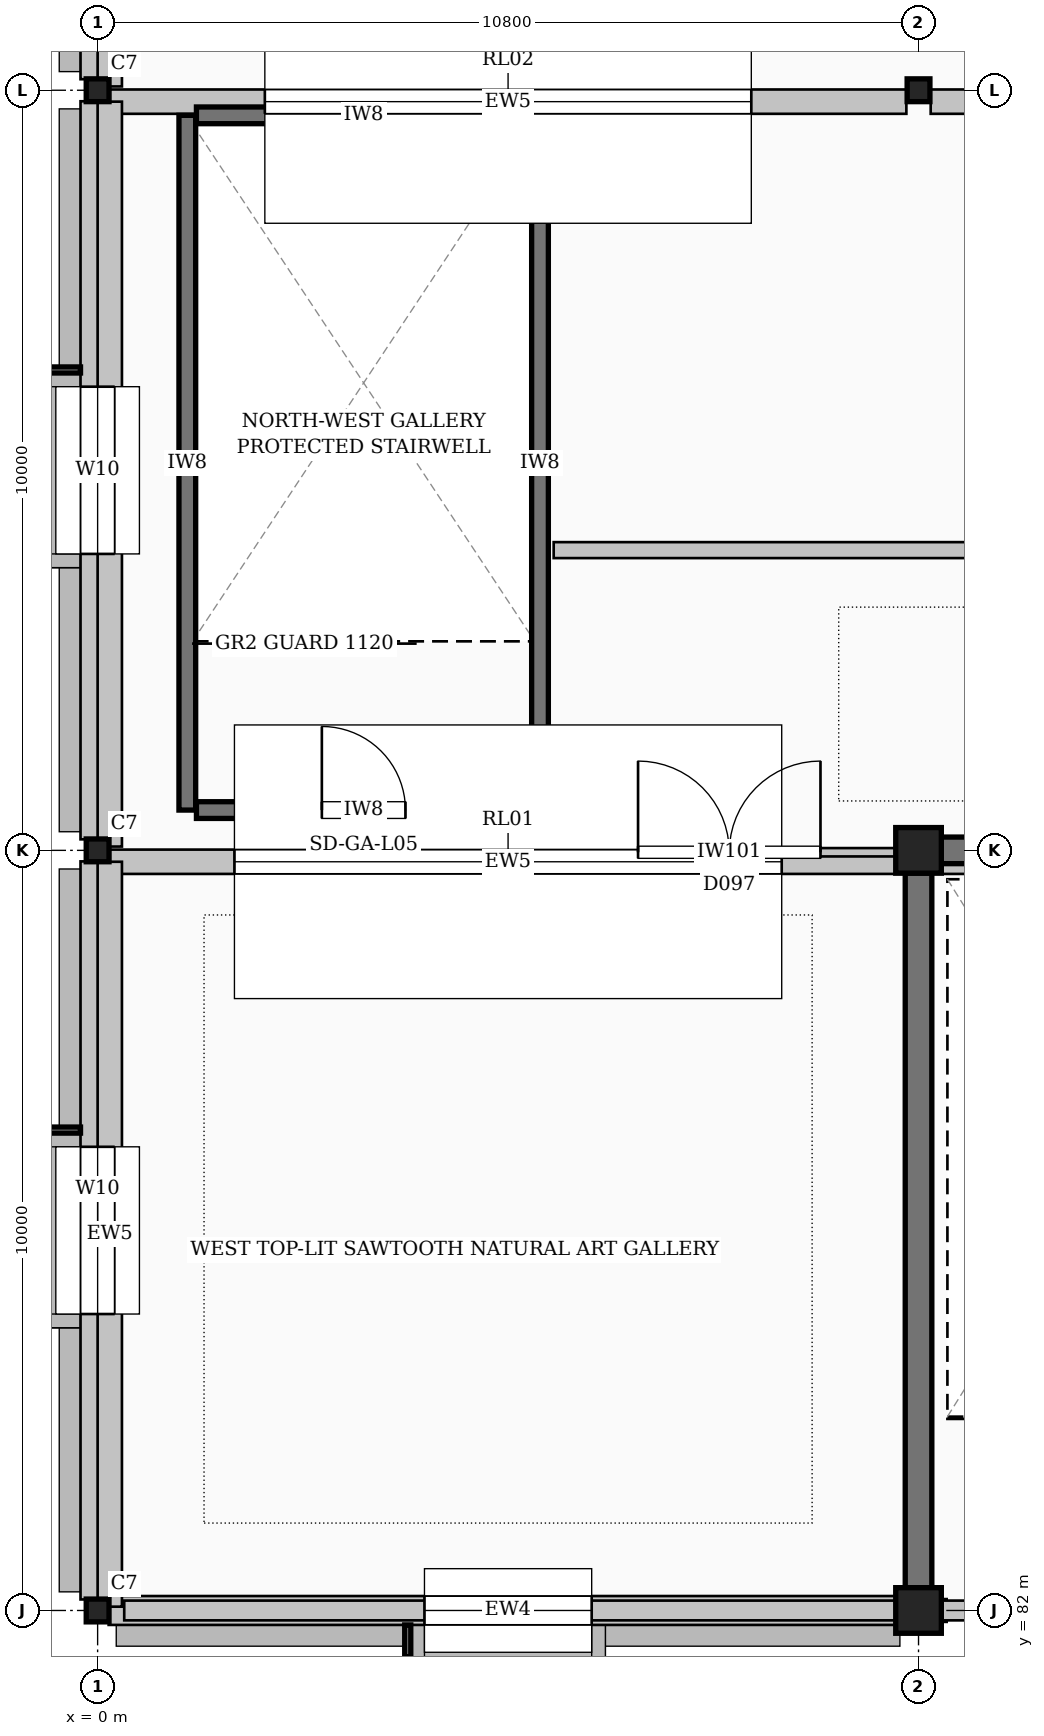
"""IFC4 building model, lengths in metres.
Left out: names, types, materials, properties, quantities, classifications, styles, units other than length and angle.
Written with IfcOpenShell. Run it as: python <this file> out.ifc"""

import sys

from ifc_helpers import new_model, si_unit, direction, frame, frame_2d, origin, origin_2d, place, context, subcontext, project, spatial, polyline, rectangle, i_section, outline, extrude, element, fill, save


model = new_model("IFC4")
c1 = context("Model", 3, precision=1e-05, world=origin(), true_north=direction((0.0, 1.0)))
c2 = subcontext(c1, "Body", "Model", "MODEL_VIEW")
j1 = project(units=[si_unit("LENGTHUNIT", "METRE"), si_unit("PLANEANGLEUNIT", "RADIAN")], contexts=[c1])
p1 = place(None, origin())
s1 = spatial("IfcSite", under=j1, at=p1, CompositionType="ELEMENT")
p2 = place(p1, origin())
s2 = spatial("IfcBuilding", under=s1, at=p2, CompositionType="ELEMENT")
p3 = place(p2, frame((0.0, 0.0, 28.8)))
s3 = spatial("IfcBuildingStorey", under=s2, at=p3, CompositionType="ELEMENT", Elevation=28.8)
for number, where, z_axis, x_axis in (
    (1, (0.0, 82.0, 0.0), (0.0, 0.0, 1.0), (1.0, 0.0, 0.0)),
    (2, (0.0, 92.0, 0.0), (0.0, 0.0, 1.0), (1.0, 0.0, 0.0)),
    (3, (0.0, 102.0, 0.0), (0.0, 0.0, 1.0), (1.0, 0.0, 0.0)),
):
    element("IfcColumn", number, at=place(p3, frame(where, z_axis=z_axis, x_axis=x_axis)), inside=s3, PredefinedType="COLUMN", context=c2, shape_type="SweptSolid", body=[
        extrude(i_section(OverallWidth=0.3, OverallDepth=0.3, WebThickness=0.011, FlangeThickness=0.019, FilletRadius=0.027, at=origin_2d()), origin(), (0.0, 0.0, 1.0), 5.4),
    ])
for number, where, z_axis, x_axis in (
    (4, (10.8, 82.0, 0.0), (0.0, 0.0, 1.0), (1.0, 0.0, 0.0)),
    (5, (10.8, 92.0, 0.0), (0.0, 0.0, 1.0), (1.0, 0.0, 0.0)),
):
    element("IfcColumn", number, at=place(p3, frame(where, z_axis=z_axis, x_axis=x_axis)), inside=s3, PredefinedType="COLUMN", context=c2, shape_type="SweptSolid", body=[
        extrude(rectangle(XDim=0.6, YDim=0.6, at=origin_2d()), origin(), (0.0, 0.0, 1.0), 5.4),
    ])
p4 = place(p3, frame((10.8, 102.0, 0.0), z_axis=(0.0, 0.0, 1.0), x_axis=(1.0, 0.0, 0.0)))
e6 = element("IfcColumn", 6, at=p4, inside=s3, PredefinedType="COLUMN", context=c2, shape_type="SweptSolid", body=[
    extrude(i_section(OverallWidth=0.3, OverallDepth=0.3, WebThickness=0.011, FlangeThickness=0.019, FilletRadius=0.027, at=origin_2d()), origin(), (0.0, 0.0, 1.0), 5.4),
])
p5 = place(p3, frame((0.0, 111.855, 0.0), z_axis=(0.0, 0.0, 1.0), x_axis=(0.0, -1.0, 0.0)))
e7 = element("IfcWall", 7, at=p5, inside=s3, PredefinedType="STANDARD", context=c2, shape_type="SweptSolid", body=[
    extrude(rectangle(XDim=9.71, YDim=0.45, at=frame_2d((4.855, 0.0))), origin(), (0.0, 0.0, 1.0), 5.16),
])
p6 = place(p5, frame((3.755, 0.0, 1.0)))
e8 = element("IfcOpeningElement", 8, at=p6, cuts=e7, PredefinedType="OPENING", context=c2, shape_type="SweptSolid", body=[
    extrude(rectangle(XDim=2.2, YDim=3.0, at=frame_2d((1.1, 1.5))), frame((0.0, 0.235, 0.0), z_axis=(0.0, -1.0, 0.0), x_axis=(1.0, 0.0, 0.0)), (0.0, 0.0, 1.0), 0.47),
])
p7 = place(p3, frame((0.0, 101.855, 0.0), z_axis=(0.0, 0.0, 1.0), x_axis=(0.0, -1.0, 0.0)))
e9 = element("IfcWall", 9, at=p7, inside=s3, PredefinedType="STANDARD", context=c2, shape_type="SweptSolid", body=[
    extrude(rectangle(XDim=9.71, YDim=0.45, at=frame_2d((4.855, 0.0))), origin(), (0.0, 0.0, 1.0), 5.16),
])
p8 = place(p7, frame((3.755, 0.0, 1.0)))
e10 = element("IfcOpeningElement", 10, at=p8, cuts=e9, PredefinedType="OPENING", context=c2, shape_type="SweptSolid", body=[
    extrude(rectangle(XDim=2.2, YDim=3.0, at=frame_2d((1.1, 1.5))), frame((0.0, 0.235, 0.0), z_axis=(0.0, -1.0, 0.0), x_axis=(1.0, 0.0, 0.0)), (0.0, 0.0, 1.0), 0.47),
])
p9 = place(p3, frame((0.0, 91.855, 0.0), z_axis=(0.0, 0.0, 1.0), x_axis=(0.0, -1.0, 0.0)))
e11 = element("IfcWall", 11, at=p9, inside=s3, PredefinedType="STANDARD", context=c2, shape_type="SweptSolid", body=[
    extrude(rectangle(XDim=9.71, YDim=0.45, at=frame_2d((4.855, 0.0))), origin(), (0.0, 0.0, 1.0), 5.16),
])
p10 = place(p9, frame((3.755, 0.0, 1.0)))
e12 = element("IfcOpeningElement", 12, at=p10, cuts=e11, PredefinedType="OPENING", context=c2, shape_type="SweptSolid", body=[
    extrude(rectangle(XDim=2.2, YDim=3.0, at=frame_2d((1.1, 1.5))), frame((0.0, 0.235, 0.0), z_axis=(0.0, -1.0, 0.0), x_axis=(1.0, 0.0, 0.0)), (0.0, 0.0, 1.0), 0.47),
])
p11 = place(p3, frame((0.145, 82.0, 0.0), z_axis=(0.0, 0.0, 1.0), x_axis=(1.0, 0.0, 0.0)))
e13 = element("IfcWall", 13, at=p11, inside=s3, PredefinedType="STANDARD", context=c2, shape_type="SweptSolid", body=[
    extrude(rectangle(XDim=10.51, YDim=0.38, at=frame_2d((5.255, 0.0))), origin(), (0.0, 0.0, 1.0), 5.044),
])
p12 = place(p11, frame((4.155, 0.0, 1.0)))
e14 = element("IfcOpeningElement", 14, at=p12, cuts=e13, PredefinedType="OPENING", context=c2, shape_type="SweptSolid", body=[
    extrude(rectangle(XDim=2.2, YDim=3.0, at=frame_2d((1.1, 1.5))), frame((0.0, 0.2, 0.0), z_axis=(0.0, -1.0, 0.0), x_axis=(1.0, 0.0, 0.0)), (0.0, 0.0, 1.0), 0.4),
])
p13 = place(p3, frame((10.945, 82.0, 0.0), z_axis=(0.0, 0.0, 1.0), x_axis=(1.0, 0.0, 0.0)))
e15 = element("IfcWall", 15, at=p13, inside=s3, PredefinedType="STANDARD", context=c2, shape_type="SweptSolid", body=[
    extrude(rectangle(XDim=0.225, YDim=0.3, at=frame_2d((0.112, 0.0))), origin(), (0.0, 0.0, 1.0), 5.16),
])
p14 = place(p3, frame((0.16, 91.85, 5.4), z_axis=(0.0, 0.0, 1.0), x_axis=(1.0, 0.0, 0.0)))
e16 = element("IfcWall", 16, at=p14, inside=s3, PredefinedType="STANDARD", context=c2, shape_type="SweptSolid", body=[
    extrude(rectangle(XDim=10.48, YDim=0.32, at=frame_2d((5.24, 0.0))), origin(), (0.0, 0.0, 1.0), 2.45),
])
p15 = place(p14, frame((1.64, 0.0, 0.45)))
e17 = element("IfcOpeningElement", 17, at=p15, cuts=e16, PredefinedType="OPENING", context=c2, shape_type="SweptSolid", body=[
    extrude(rectangle(XDim=7.2, YDim=1.5, at=frame_2d((3.6, 0.75))), frame((0.0, 0.17, 0.0), z_axis=(0.0, -1.0, 0.0), x_axis=(1.0, 0.0, 0.0)), (0.0, 0.0, 1.0), 0.34),
])
p16 = place(p3, frame((10.96, 91.85, 5.4), z_axis=(0.0, 0.0, 1.0), x_axis=(1.0, 0.0, 0.0)))
e18 = element("IfcWall", 18, at=p16, inside=s3, PredefinedType="STANDARD", context=c2, shape_type="SweptSolid", body=[
    extrude(rectangle(XDim=10.48, YDim=0.32, at=frame_2d((5.24, 0.0))), origin(), (0.0, 0.0, 1.0), 2.45),
])
p17 = place(p16, frame((1.64, 0.0, 0.45)))
e19 = element("IfcOpeningElement", 19, at=p17, cuts=e18, PredefinedType="OPENING", context=c2, shape_type="SweptSolid", body=[
    extrude(rectangle(XDim=7.2, YDim=1.5, at=frame_2d((3.6, 0.75))), frame((0.0, 0.17, 0.0), z_axis=(0.0, -1.0, 0.0), x_axis=(1.0, 0.0, 0.0)), (0.0, 0.0, 1.0), 0.34),
])
p18 = place(p3, frame((0.16, 82.05, 5.4), z_axis=(0.0, 0.0, 1.0), x_axis=(0.0, 1.0, 0.0)))
e20 = element("IfcWall", 20, at=p18, inside=s3, PredefinedType="STANDARD", context=c2, shape_type="SweptSolid", body=[
    extrude(outline(polyline([(0.0, 0.0), (9.8, 0.0), (9.8, 2.55), (0.0, 0.15), (0.0, 0.0)])), frame((0.0, 0.16, 0.0), z_axis=(0.0, -1.0, 0.0), x_axis=(1.0, 0.0, 0.0)), (0.0, 0.0, 1.0), 0.32),
])
p19 = place(p3, frame((0.16, 101.85, 5.4), z_axis=(0.0, 0.0, 1.0), x_axis=(1.0, 0.0, 0.0)))
e21 = element("IfcWall", 21, at=p19, inside=s3, PredefinedType="STANDARD", context=c2, shape_type="SweptSolid", body=[
    extrude(rectangle(XDim=10.48, YDim=0.32, at=frame_2d((5.24, 0.0))), origin(), (0.0, 0.0, 1.0), 2.45),
])
p20 = place(p19, frame((2.04, 0.0, 0.45)))
e22 = element("IfcOpeningElement", 22, at=p20, cuts=e21, PredefinedType="OPENING", context=c2, shape_type="SweptSolid", body=[
    extrude(rectangle(XDim=6.4, YDim=1.5, at=frame_2d((3.2, 0.75))), frame((0.0, 0.17, 0.0), z_axis=(0.0, -1.0, 0.0), x_axis=(1.0, 0.0, 0.0)), (0.0, 0.0, 1.0), 0.34),
])
p21 = place(p3, frame((10.96, 101.85, 5.4), z_axis=(0.0, 0.0, 1.0), x_axis=(1.0, 0.0, 0.0)))
e23 = element("IfcWall", 23, at=p21, inside=s3, PredefinedType="STANDARD", context=c2, shape_type="SweptSolid", body=[
    extrude(rectangle(XDim=10.48, YDim=0.32, at=frame_2d((5.24, 0.0))), origin(), (0.0, 0.0, 1.0), 2.45),
])
p22 = place(p21, frame((2.04, 0.0, 0.45)))
e24 = element("IfcOpeningElement", 24, at=p22, cuts=e23, PredefinedType="OPENING", context=c2, shape_type="SweptSolid", body=[
    extrude(rectangle(XDim=6.4, YDim=1.5, at=frame_2d((3.2, 0.75))), frame((0.0, 0.17, 0.0), z_axis=(0.0, -1.0, 0.0), x_axis=(1.0, 0.0, 0.0)), (0.0, 0.0, 1.0), 0.34),
])
for number, where, z_axis, x_axis in (
    (25, (0.16, 92.05, 5.4), (0.0, 0.0, 1.0), (0.0, 1.0, 0.0)),
    (26, (0.16, 102.05, 5.4), (0.0, 0.0, 1.0), (0.0, 1.0, 0.0)),
):
    element("IfcWall", number, at=place(p3, frame(where, z_axis=z_axis, x_axis=x_axis)), inside=s3, PredefinedType="STANDARD", context=c2, shape_type="SweptSolid", body=[
        extrude(outline(polyline([(0.0, 0.0), (9.8, 0.0), (9.8, 2.55), (0.0, 0.15), (0.0, 0.0)])), frame((0.0, 0.16, 0.0), z_axis=(0.0, -1.0, 0.0), x_axis=(1.0, 0.0, 0.0)), (0.0, 0.0, 1.0), 0.32),
    ])
p23 = place(p3, frame((0.35, 82.0, 5.22), z_axis=(0.0, 0.0, 1.0), x_axis=(1.0, 0.0, 0.0)))
e27 = element("IfcWall", 27, at=p23, inside=s3, PredefinedType="PARAPET", context=c2, shape_type="SweptSolid", body=[
    extrude(rectangle(XDim=74.9, YDim=0.26, at=frame_2d((37.45, 0.0))), origin(), (0.0, 0.0, 1.0), 0.55),
])
p24 = place(p3, frame((11.1, 92.0, 0.0), z_axis=(0.0, 0.0, 1.0), x_axis=(1.0, 0.0, 0.0)))
e28 = element("IfcWall", 28, at=p24, inside=s3, PredefinedType="SHEAR", context=c2, shape_type="SweptSolid", body=[
    extrude(rectangle(XDim=10.2, YDim=0.35, at=frame_2d((5.1, 0.0))), origin(), (0.0, 0.0, 1.0), 5.16),
])
p25 = place(p3, frame((10.8, 82.3, 0.0), z_axis=(0.0, 0.0, 1.0), x_axis=(0.0, 1.0, 0.0)))
e29 = element("IfcWall", 29, at=p25, inside=s3, PredefinedType="SHEAR", context=c2, shape_type="SweptSolid", body=[
    extrude(rectangle(XDim=9.4, YDim=0.35, at=frame_2d((4.7, 0.0))), origin(), (0.0, 0.0, 1.0), 5.16),
])
for number, where, z_axis, x_axis in (
    (30, (1.18, 92.53, 0.0), (0.0, 0.0, 1.0), (0.0, 1.0, 0.0)),
    (31, (5.82, 92.53, 0.0), (0.0, 0.0, 1.0), (0.0, 1.0, 0.0)),
):
    element("IfcWall", number, at=place(p3, frame(where, z_axis=z_axis, x_axis=x_axis)), inside=s3, PredefinedType="SHEAR", context=c2, shape_type="SweptSolid", body=[
        extrude(rectangle(XDim=9.14, YDim=0.22, at=frame_2d((4.57, 0.0))), origin(), (0.0, 0.0, 1.0), 5.16),
    ])
p26 = place(p3, frame((1.3, 101.67, 0.0), z_axis=(0.0, 0.0, 1.0), x_axis=(1.0, 0.0, 0.0)))
e32 = element("IfcWall", 32, at=p26, inside=s3, PredefinedType="SHEAR", context=c2, shape_type="SweptSolid", body=[
    extrude(rectangle(XDim=4.4, YDim=0.22, at=frame_2d((2.2, 0.0))), origin(), (0.0, 0.0, 1.0), 5.16),
])
p27 = place(p3, frame((1.3, 92.53, 0.0), z_axis=(0.0, 0.0, 1.0), x_axis=(1.0, 0.0, 0.0)))
e33 = element("IfcWall", 33, at=p27, inside=s3, PredefinedType="SHEAR", context=c2, shape_type="SweptSolid", body=[
    extrude(rectangle(XDim=4.4, YDim=0.22, at=frame_2d((2.2, 0.0))), origin(), (0.0, 0.0, 1.0), 5.16),
])
p28 = place(p27, frame((1.65, 0.0, 0.0)))
e34 = element("IfcOpeningElement", 34, at=p28, cuts=e33, PredefinedType="OPENING", context=c2, shape_type="SweptSolid", body=[
    extrude(rectangle(XDim=1.1, YDim=2.2, at=frame_2d((0.55, 1.1))), frame((0.0, 0.12, 0.0), z_axis=(0.0, -1.0, 0.0), x_axis=(1.0, 0.0, 0.0)), (0.0, 0.0, 1.0), 0.24),
])
p29 = place(p3, frame((6.0, 91.975, 0.0), z_axis=(0.0, 0.0, 1.0), x_axis=(1.0, 0.0, 0.0)))
e35 = element("IfcWall", 35, at=p29, inside=s3, PredefinedType="PARTITIONING", context=c2, shape_type="SweptSolid", body=[
    extrude(rectangle(XDim=4.62, YDim=0.11, at=frame_2d((2.31, 0.0))), origin(), (0.0, 0.0, 1.0), 5.044),
])
p30 = place(p29, frame((1.11, 0.0, 0.0)))
e36 = element("IfcOpeningElement", 36, at=p30, cuts=e35, PredefinedType="OPENING", context=c2, shape_type="SweptSolid", body=[
    extrude(rectangle(XDim=2.4, YDim=2.8, at=frame_2d((1.2, 1.4))), frame((0.0, 0.065, 0.0), z_axis=(0.0, -1.0, 0.0), x_axis=(1.0, 0.0, 0.0)), (0.0, 0.0, 1.0), 0.13),
])
p31 = place(p3, frame((6.0, 95.95, 0.0), z_axis=(0.0, 0.0, 1.0), x_axis=(1.0, 0.0, 0.0)))
e37 = element("IfcWall", 37, at=p31, inside=s3, PredefinedType="PARTITIONING", context=c2, shape_type="SweptSolid", body=[
    extrude(rectangle(XDim=15.42, YDim=0.21, at=frame_2d((7.71, 0.0))), origin(), (0.0, 0.0, 1.0), 5.12),
])
p32 = place(p31, frame((6.51, 0.0, 0.0)))
e38 = element("IfcOpeningElement", 38, at=p32, cuts=e37, PredefinedType="OPENING", context=c2, shape_type="SweptSolid", body=[
    extrude(rectangle(XDim=2.4, YDim=2.8, at=frame_2d((1.2, 1.4))), frame((0.0, 0.115, 0.0), z_axis=(0.0, -1.0, 0.0), x_axis=(1.0, 0.0, 0.0)), (0.0, 0.0, 1.0), 0.23),
])
p33 = place(p8, origin())
e39 = element("IfcWindow", 39, at=p33, inside=s3, PartitioningType="SINGLE_PANEL", PredefinedType="WINDOW", context=c2, shape_type="SweptSolid", body=[
    extrude(rectangle(XDim=2.2, YDim=3.0, at=frame_2d((1.1, 1.5))), frame((0.0, 0.03, 0.0), z_axis=(0.0, -1.0, 0.0), x_axis=(1.0, 0.0, 0.0)), (0.0, 0.0, 1.0), 0.06),
])
fill(e10, e39)
p34 = place(p10, origin())
e40 = element("IfcWindow", 40, at=p34, inside=s3, PartitioningType="SINGLE_PANEL", PredefinedType="WINDOW", context=c2, shape_type="SweptSolid", body=[
    extrude(rectangle(XDim=2.2, YDim=3.0, at=frame_2d((1.1, 1.5))), frame((0.0, 0.03, 0.0), z_axis=(0.0, -1.0, 0.0), x_axis=(1.0, 0.0, 0.0)), (0.0, 0.0, 1.0), 0.06),
])
fill(e12, e40)
p35 = place(p12, origin())
e41 = element("IfcWindow", 41, at=p35, inside=s3, PartitioningType="SINGLE_PANEL", PredefinedType="WINDOW", context=c2, shape_type="SweptSolid", body=[
    extrude(rectangle(XDim=2.2, YDim=3.0, at=frame_2d((1.1, 1.5))), frame((0.0, 0.03, 0.0), z_axis=(0.0, -1.0, 0.0), x_axis=(1.0, 0.0, 0.0)), (0.0, 0.0, 1.0), 0.06),
])
fill(e14, e41)
p36 = place(p15, origin())
e42 = element("IfcWindow", 42, at=p36, inside=s3, PartitioningType="SINGLE_PANEL", PredefinedType="SKYLIGHT", context=c2, shape_type="SweptSolid", body=[
    extrude(rectangle(XDim=7.2, YDim=1.5, at=frame_2d((3.6, 0.75))), frame((0.0, 0.03, 0.0), z_axis=(0.0, -1.0, 0.0), x_axis=(1.0, 0.0, 0.0)), (0.0, 0.0, 1.0), 0.06),
])
fill(e17, e42)
p37 = place(p20, origin())
e43 = element("IfcWindow", 43, at=p37, inside=s3, PartitioningType="SINGLE_PANEL", PredefinedType="SKYLIGHT", context=c2, shape_type="SweptSolid", body=[
    extrude(rectangle(XDim=6.4, YDim=1.5, at=frame_2d((3.2, 0.75))), frame((0.0, 0.03, 0.0), z_axis=(0.0, -1.0, 0.0), x_axis=(1.0, 0.0, 0.0)), (0.0, 0.0, 1.0), 0.06),
])
fill(e22, e43)
p38 = place(p28, origin())
e44 = element("IfcDoor", 44, at=p38, inside=s3, OperationType="SINGLE_SWING_LEFT", PredefinedType="DOOR", context=c2, shape_type="SweptSolid", body=[
    extrude(rectangle(XDim=1.1, YDim=2.2, at=frame_2d((0.55, 1.1))), frame((0.0, 0.025, 0.0), z_axis=(0.0, -1.0, 0.0), x_axis=(1.0, 0.0, 0.0)), (0.0, 0.0, 1.0), 0.05),
])
fill(e34, e44)
p39 = place(p30, origin())
e45 = element("IfcDoor", 45, at=p39, inside=s3, OperationType="DOUBLE_DOOR_SINGLE_SWING", PredefinedType="DOOR", context=c2, shape_type="SweptSolid", body=[
    extrude(rectangle(XDim=2.4, YDim=2.8, at=frame_2d((1.2, 1.4))), frame((0.0, 0.025, 0.0), z_axis=(0.0, -1.0, 0.0), x_axis=(1.0, 0.0, 0.0)), (0.0, 0.0, 1.0), 0.05),
])
fill(e36, e45)
save(model, sys.argv[1])
